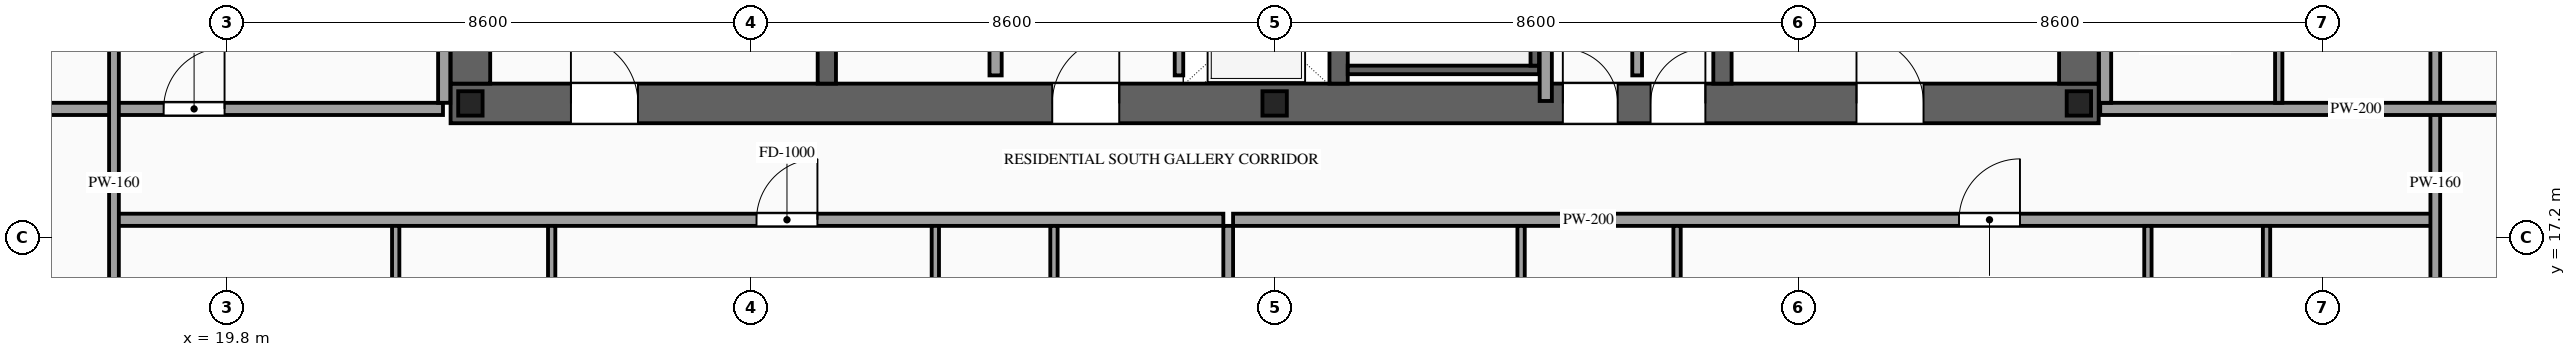
"""IFC4 building model, lengths in metres.
Left out: names, types, materials, properties, quantities, classifications, styles, units other than length and angle.
Written with IfcOpenShell. Run it as: python <this file> out.ifc"""

import sys

from ifc_helpers import new_model, si_unit, direction, frame, frame_2d, origin, origin_2d, place, context, subcontext, project, spatial, rectangle, i_section, extrude, source, transform, mapped, element, fill, save


model = new_model("IFC4")
c1 = context("Model", 3, precision=1e-05, world=origin(), true_north=direction((0.0, 1.0)))
c2 = subcontext(c1, "Body", "Model", "MODEL_VIEW")
j1 = project(units=[si_unit("LENGTHUNIT", "METRE"), si_unit("PLANEANGLEUNIT", "RADIAN")], contexts=[c1])
p1 = place(None, origin())
s1 = spatial("IfcSite", under=j1, at=p1, CompositionType="ELEMENT")
p2 = place(p1, origin())
s2 = spatial("IfcBuilding", under=s1, at=p2, CompositionType="ELEMENT")
p3 = place(p2, frame((0.0, 0.0, 191.5)))
s3 = spatial("IfcBuildingStorey", under=s2, at=p3, CompositionType="ELEMENT", Elevation=191.5)
p4 = place(p3, frame((23.475, 19.4, 0.0), z_axis=(0.0, 0.0, 1.0), x_axis=(1.0, 0.0, 0.0)))
e1 = element("IfcWall", 1, at=p4, inside=s3, PredefinedType="SHEAR", context=c2, shape_type="SweptSolid", body=[
    extrude(rectangle(XDim=27.05, YDim=0.65, at=frame_2d((13.525, 0.0))), origin(), (0.0, 0.0, 1.0), 3.5),
])
p5 = place(p4, frame((1.975, 0.0, 0.0)))
e2 = element("IfcOpeningElement", 2, at=p5, cuts=e1, PredefinedType="OPENING", context=c2, shape_type="SweptSolid", body=[
    extrude(rectangle(XDim=1.1, YDim=2.2, at=frame_2d((0.55, 1.1))), frame((0.0, 0.34, 0.0), z_axis=(0.0, -1.0, 0.0), x_axis=(1.0, 0.0, 0.0)), (0.0, 0.0, 1.0), 0.68),
])
p6 = place(p4, frame((9.875, 0.0, 0.0)))
e3 = element("IfcOpeningElement", 3, at=p6, cuts=e1, PredefinedType="OPENING", context=c2, shape_type="SweptSolid", body=[
    extrude(rectangle(XDim=1.1, YDim=2.2, at=frame_2d((0.55, 1.1))), frame((0.0, 0.34, 0.0), z_axis=(0.0, -1.0, 0.0), x_axis=(1.0, 0.0, 0.0)), (0.0, 0.0, 1.0), 0.68),
])
p7 = place(p4, frame((23.075, 0.0, 0.0)))
e4 = element("IfcOpeningElement", 4, at=p7, cuts=e1, PredefinedType="OPENING", context=c2, shape_type="SweptSolid", body=[
    extrude(rectangle(XDim=1.1, YDim=2.2, at=frame_2d((0.55, 1.1))), frame((0.0, 0.34, 0.0), z_axis=(0.0, -1.0, 0.0), x_axis=(1.0, 0.0, 0.0)), (0.0, 0.0, 1.0), 0.68),
])
p8 = place(p4, frame((19.695, 0.0, 0.0)))
e5 = element("IfcOpeningElement", 5, at=p8, cuts=e1, PredefinedType="OPENING", context=c2, shape_type="SweptSolid", body=[
    extrude(rectangle(XDim=0.9, YDim=2.15, at=frame_2d((0.45, 1.075))), frame((0.0, 0.34, 0.0), z_axis=(0.0, -1.0, 0.0), x_axis=(1.0, 0.0, 0.0)), (0.0, 0.0, 1.0), 0.68),
])
p9 = place(p4, frame((18.255, 0.0, 0.0)))
e6 = element("IfcOpeningElement", 6, at=p9, cuts=e1, PredefinedType="OPENING", context=c2, shape_type="SweptSolid", body=[
    extrude(rectangle(XDim=0.9, YDim=2.15, at=frame_2d((0.45, 1.075))), frame((0.0, 0.34, 0.0), z_axis=(0.0, -1.0, 0.0), x_axis=(1.0, 0.0, 0.0)), (0.0, 0.0, 1.0), 0.68),
])
m1 = source(origin(), c2, "Body", "SweptSolid", [
    extrude(rectangle(XDim=12.15, YDim=0.65, at=frame_2d((6.075, 0.0))), origin(), (0.0, 0.0, 1.0), 3.5),
])
for number, where, z_axis, x_axis in (
    (7, (23.8, 19.725, 0.0), (0.0, 0.0, 1.0), (0.0, 1.0, 0.0)),
    (8, (50.2, 19.725, 0.0), (0.0, 0.0, 1.0), (0.0, 1.0, 0.0)),
):
    element("IfcWall", number, at=place(p3, frame(where, z_axis=z_axis, x_axis=x_axis)), inside=s3, PredefinedType="SHEAR", context=c2, shape_type="MappedRepresentation", body=[
        mapped(m1, transform((0.0, 0.0, 0.0), scale=1.0)),
    ])
m2 = source(origin(), c2, "Body", "SweptSolid", [
    extrude(rectangle(XDim=12.15, YDim=0.3, at=frame_2d((6.075, 0.0))), origin(), (0.0, 0.0, 1.0), 3.5),
])
for number, where, z_axis, x_axis in (
    (9, (29.65, 19.725, 0.0), (0.0, 0.0, 1.0), (0.0, 1.0, 0.0)),
    (10, (38.05, 19.725, 0.0), (0.0, 0.0, 1.0), (0.0, 1.0, 0.0)),
    (11, (44.35, 19.725, 0.0), (0.0, 0.0, 1.0), (0.0, 1.0, 0.0)),
):
    element("IfcWall", number, at=place(p3, frame(where, z_axis=z_axis, x_axis=x_axis)), inside=s3, PredefinedType="SOLIDWALL", context=c2, shape_type="MappedRepresentation", body=[
        mapped(m2, transform((0.0, 0.0, 0.0), scale=1.0)),
    ])
m3 = source(origin(), c2, "Body", "SweptSolid", [
    extrude(i_section(OverallWidth=0.4, OverallDepth=0.4, WebThickness=0.013, FlangeThickness=0.021, at=origin_2d()), origin(), (0.0, 0.0, 1.0), 3.5),
])
for number, where, z_axis, x_axis in (
    (12, (23.8, 19.4, 0.0), (0.0, 0.0, 1.0), (1.0, 0.0, 0.0)),
    (13, (37.0, 19.4, 0.0), (0.0, 0.0, 1.0), (1.0, 0.0, 0.0)),
    (14, (50.2, 19.4, 0.0), (0.0, 0.0, 1.0), (1.0, 0.0, 0.0)),
):
    element("IfcColumn", number, at=place(p3, frame(where, z_axis=z_axis, x_axis=x_axis)), inside=s3, PredefinedType="COLUMN", context=c2, shape_type="MappedRepresentation", body=[
        mapped(m3, transform((0.0, 0.0, 0.0), scale=1.0)),
    ])
p10 = place(p3, frame((35.43, 19.86, 0.0), z_axis=(0.0, 0.0, 1.0), x_axis=(0.0, 1.0, 0.0)))
e15 = element("IfcWall", 15, at=p10, inside=s3, PredefinedType="SOLIDWALL", context=c2, shape_type="SweptSolid", body=[
    extrude(rectangle(XDim=2.04, YDim=0.14, at=frame_2d((1.02, 0.0))), origin(), (0.0, 0.0, 1.0), 3.28),
])
p11 = place(p10, frame((0.47, 0.0, 0.0)))
e16 = element("IfcOpeningElement", 16, at=p11, cuts=e15, PredefinedType="OPENING", context=c2, shape_type="SweptSolid", body=[
    extrude(rectangle(XDim=1.1, YDim=2.2, at=frame_2d((0.55, 1.1))), frame((0.0, 0.085, 0.0), z_axis=(0.0, -1.0, 0.0), x_axis=(1.0, 0.0, 0.0)), (0.0, 0.0, 1.0), 0.17),
])
m4 = source(origin(), c2, "Body", "SweptSolid", [
    extrude(rectangle(XDim=3.14, YDim=0.14, at=frame_2d((1.57, 0.0))), origin(), (0.0, 0.0, 1.0), 3.28),
])
p12 = place(p3, frame((38.2, 19.95, 0.0), z_axis=(0.0, 0.0, 1.0), x_axis=(1.0, 0.0, 0.0)))
e17 = element("IfcWall", 17, at=p12, inside=s3, PredefinedType="SOLIDWALL", context=c2, shape_type="MappedRepresentation", body=[
    mapped(m4, transform((0.0, 0.0, 0.0), scale=1.0)),
])
m5 = source(origin(), c2, "Body", "SweptSolid", [
    extrude(rectangle(XDim=8.94, YDim=0.14, at=frame_2d((4.47, 0.0))), origin(), (0.0, 0.0, 1.0), 3.28),
])
p13 = place(p3, frame((41.27, 20.02, 0.0), z_axis=(0.0, 0.0, 1.0), x_axis=(0.0, 1.0, 0.0)))
e18 = element("IfcWall", 18, at=p13, inside=s3, PredefinedType="SOLIDWALL", context=c2, shape_type="MappedRepresentation", body=[
    mapped(m5, transform((0.0, 0.0, 0.0), scale=1.0)),
])
p14 = place(p3, frame((32.42, 19.86, 0.0), z_axis=(0.0, 0.0, 1.0), x_axis=(0.0, 1.0, 0.0)))
e19 = element("IfcWall", 19, at=p14, inside=s3, PredefinedType="PARTITIONING", context=c2, shape_type="SweptSolid", body=[
    extrude(rectangle(XDim=7.94, YDim=0.2, at=frame_2d((3.97, 0.0))), origin(), (0.0, 0.0, 1.0), 3.28),
])
p15 = place(p14, frame((3.52, 0.0, 0.0)))
e20 = element("IfcOpeningElement", 20, at=p15, cuts=e19, PredefinedType="OPENING", context=c2, shape_type="SweptSolid", body=[
    extrude(rectangle(XDim=0.9, YDim=2.15, at=frame_2d((0.45, 1.075))), frame((0.0, 0.115, 0.0), z_axis=(0.0, -1.0, 0.0), x_axis=(1.0, 0.0, 0.0)), (0.0, 0.0, 1.0), 0.23),
])
m6 = source(origin(), c2, "Body", "SweptSolid", [
    extrude(rectangle(XDim=1.34, YDim=0.16, at=frame_2d((0.67, 0.0))), origin(), (0.0, 0.0, 1.0), 3.28),
])
p16 = place(p3, frame((42.95, 19.86, 0.0), z_axis=(0.0, 0.0, 1.0), x_axis=(0.0, 1.0, 0.0)))
e21 = element("IfcWall", 21, at=p16, inside=s3, PredefinedType="PARTITIONING", context=c2, shape_type="MappedRepresentation", body=[
    mapped(m6, transform((0.0, 0.0, 0.0), scale=1.0)),
])
m7 = source(origin(), c2, "Body", "SweptSolid", [
    extrude(rectangle(XDim=6.51, YDim=0.2, at=frame_2d((3.255, 0.0))), origin(), (0.0, 0.0, 1.0), 3.28),
])
p17 = place(p3, frame((41.45, 19.44, 0.0), z_axis=(0.0, 0.0, 1.0), x_axis=(0.0, 1.0, 0.0)))
e22 = element("IfcWall", 22, at=p17, inside=s3, PredefinedType="PARTITIONING", context=c2, shape_type="MappedRepresentation", body=[
    mapped(m7, transform((0.0, 0.0, 0.0), scale=1.0)),
])
p18 = place(p3, frame((17.94, 17.49, 0.0), z_axis=(0.0, 0.0, 1.0), x_axis=(1.0, 0.0, 0.0)))
e23 = element("IfcWall", 23, at=p18, inside=s3, PredefinedType="PARTITIONING", context=c2, shape_type="SweptSolid", body=[
    extrude(rectangle(XDim=18.218, YDim=0.2, at=frame_2d((9.109, 0.0))), origin(), (0.0, 0.0, 1.0), 3.28),
])
p19 = place(p18, frame((10.556, 0.0, 0.0)))
e24 = element("IfcOpeningElement", 24, at=p19, cuts=e23, PredefinedType="OPENING", context=c2, shape_type="SweptSolid", body=[
    extrude(rectangle(XDim=1.0, YDim=2.2, at=frame_2d((0.5, 1.1))), frame((0.0, 0.115, 0.0), z_axis=(0.0, -1.0, 0.0), x_axis=(1.0, 0.0, 0.0)), (0.0, 0.0, 1.0), 0.23),
])
m8 = source(origin(), c2, "Body", "SweptSolid", [
    extrude(rectangle(XDim=13.54, YDim=0.16, at=frame_2d((6.77, 0.0))), origin(), (0.0, 0.0, 1.0), 3.28),
])
p20 = place(p3, frame((36.238, 3.85, 0.0), z_axis=(0.0, 0.0, 1.0), x_axis=(0.0, 1.0, 0.0)))
e25 = element("IfcWall", 25, at=p20, inside=s3, PredefinedType="PARTITIONING", context=c2, shape_type="MappedRepresentation", body=[
    mapped(m8, transform((0.0, 0.0, 0.0), scale=1.0)),
])
m9 = source(origin(), c2, "Body", "SweptSolid", [
    extrude(rectangle(XDim=5.61, YDim=0.12, at=frame_2d((2.805, 0.0))), origin(), (0.0, 0.0, 1.0), 3.28),
])
p21 = place(p3, frame((22.574, 11.78, 0.0), z_axis=(0.0, 0.0, 1.0), x_axis=(0.0, 1.0, 0.0)))
e26 = element("IfcWall", 26, at=p21, inside=s3, PredefinedType="PARTITIONING", context=c2, shape_type="MappedRepresentation", body=[
    mapped(m9, transform((0.0, 0.0, 0.0), scale=1.0)),
])
p22 = place(p3, frame((25.134, 11.78, 0.0), z_axis=(0.0, 0.0, 1.0), x_axis=(0.0, 1.0, 0.0)))
e27 = element("IfcWall", 27, at=p22, inside=s3, PredefinedType="PARTITIONING", context=c2, shape_type="SweptSolid", body=[
    extrude(rectangle(XDim=5.61, YDim=0.12, at=frame_2d((2.805, 0.0))), origin(), (0.0, 0.0, 1.0), 3.28),
])
p23 = place(p22, frame((2.38, 0.0, 0.0)))
e28 = element("IfcOpeningElement", 28, at=p23, cuts=e27, PredefinedType="OPENING", context=c2, shape_type="SweptSolid", body=[
    extrude(rectangle(XDim=0.85, YDim=2.1, at=frame_2d((0.425, 1.05))), frame((0.0, 0.075, 0.0), z_axis=(0.0, -1.0, 0.0), x_axis=(1.0, 0.0, 0.0)), (0.0, 0.0, 1.0), 0.15),
])
for number, where, z_axis, x_axis in (
    (29, (33.378, 11.78, 0.0), (0.0, 0.0, 1.0), (0.0, 1.0, 0.0)),
    (30, (31.431, 11.78, 0.0), (0.0, 0.0, 1.0), (0.0, 1.0, 0.0)),
):
    element("IfcWall", number, at=place(p3, frame(where, z_axis=z_axis, x_axis=x_axis)), inside=s3, PredefinedType="PARTITIONING", context=c2, shape_type="MappedRepresentation", body=[
        mapped(m9, transform((0.0, 0.0, 0.0), scale=1.0)),
    ])
p24 = place(p3, frame((36.318, 17.49, 0.0), z_axis=(0.0, 0.0, 1.0), x_axis=(1.0, 0.0, 0.0)))
e31 = element("IfcWall", 31, at=p24, inside=s3, PredefinedType="PARTITIONING", context=c2, shape_type="SweptSolid", body=[
    extrude(rectangle(XDim=19.742, YDim=0.2, at=frame_2d((9.871, 0.0))), origin(), (0.0, 0.0, 1.0), 3.28),
])
p25 = place(p24, frame((11.915, 0.0, 0.0)))
e32 = element("IfcOpeningElement", 32, at=p25, cuts=e31, PredefinedType="OPENING", context=c2, shape_type="SweptSolid", body=[
    extrude(rectangle(XDim=1.0, YDim=2.2, at=frame_2d((0.5, 1.1))), frame((0.0, 0.115, 0.0), z_axis=(0.0, -1.0, 0.0), x_axis=(1.0, 0.0, 0.0)), (0.0, 0.0, 1.0), 0.23),
])
p26 = place(p3, frame((41.045, 11.78, 0.0), z_axis=(0.0, 0.0, 1.0), x_axis=(0.0, 1.0, 0.0)))
e33 = element("IfcWall", 33, at=p26, inside=s3, PredefinedType="PARTITIONING", context=c2, shape_type="MappedRepresentation", body=[
    mapped(m9, transform((0.0, 0.0, 0.0), scale=1.0)),
])
p27 = place(p3, frame((43.605, 11.78, 0.0), z_axis=(0.0, 0.0, 1.0), x_axis=(0.0, 1.0, 0.0)))
e34 = element("IfcWall", 34, at=p27, inside=s3, PredefinedType="PARTITIONING", context=c2, shape_type="SweptSolid", body=[
    extrude(rectangle(XDim=5.61, YDim=0.12, at=frame_2d((2.805, 0.0))), origin(), (0.0, 0.0, 1.0), 3.28),
])
p28 = place(p27, frame((2.38, 0.0, 0.0)))
e35 = element("IfcOpeningElement", 35, at=p28, cuts=e34, PredefinedType="OPENING", context=c2, shape_type="SweptSolid", body=[
    extrude(rectangle(XDim=0.85, YDim=2.1, at=frame_2d((0.425, 1.05))), frame((0.0, 0.075, 0.0), z_axis=(0.0, -1.0, 0.0), x_axis=(1.0, 0.0, 0.0)), (0.0, 0.0, 1.0), 0.15),
])
for number, where, z_axis, x_axis in (
    (36, (53.28, 11.78, 0.0), (0.0, 0.0, 1.0), (0.0, 1.0, 0.0)),
    (37, (51.333, 11.78, 0.0), (0.0, 0.0, 1.0), (0.0, 1.0, 0.0)),
):
    element("IfcWall", number, at=place(p3, frame(where, z_axis=z_axis, x_axis=x_axis)), inside=s3, PredefinedType="PARTITIONING", context=c2, shape_type="MappedRepresentation", body=[
        mapped(m9, transform((0.0, 0.0, 0.0), scale=1.0)),
    ])
p29 = place(p3, frame((15.05, 19.31, 0.0), z_axis=(0.0, 0.0, 1.0), x_axis=(1.0, 0.0, 0.0)))
e38 = element("IfcWall", 38, at=p29, inside=s3, PredefinedType="PARTITIONING", context=c2, shape_type="SweptSolid", body=[
    extrude(rectangle(XDim=8.3, YDim=0.2, at=frame_2d((4.15, 0.0))), origin(), (0.0, 0.0, 1.0), 2.775),
])
p30 = place(p29, frame((3.715, 0.0, 0.0)))
e39 = element("IfcOpeningElement", 39, at=p30, cuts=e38, PredefinedType="OPENING", context=c2, shape_type="SweptSolid", body=[
    extrude(rectangle(XDim=1.0, YDim=2.2, at=frame_2d((0.5, 1.1))), frame((0.0, 0.115, 0.0), z_axis=(0.0, -1.0, 0.0), x_axis=(1.0, 0.0, 0.0)), (0.0, 0.0, 1.0), 0.23),
])
m10 = source(origin(), c2, "Body", "SweptSolid", [
    extrude(rectangle(XDim=6.29, YDim=0.2, at=frame_2d((3.145, 0.0))), origin(), (0.0, 0.0, 1.0), 3.28),
])
p31 = place(p3, frame((23.37, 19.41, 0.0), z_axis=(0.0, 0.0, 1.0), x_axis=(0.0, 1.0, 0.0)))
e40 = element("IfcWall", 40, at=p31, inside=s3, PredefinedType="PARTITIONING", context=c2, shape_type="MappedRepresentation", body=[
    mapped(m10, transform((0.0, 0.0, 0.0), scale=1.0)),
])
m11 = source(origin(), c2, "Body", "SweptSolid", [
    extrude(rectangle(XDim=28.19, YDim=0.16, at=frame_2d((14.095, 0.0))), origin(), (0.0, 0.0, 1.0), 3.28),
])
for number, where, z_axis, x_axis in (
    (41, (17.95, 4.0, 0.0), (0.0, 0.0, 1.0), (0.0, 1.0, 0.0)),
    (42, (56.05, 4.0, 0.0), (0.0, 0.0, 1.0), (0.0, 1.0, 0.0)),
):
    element("IfcWall", number, at=place(p3, frame(where, z_axis=z_axis, x_axis=x_axis)), inside=s3, PredefinedType="PARTITIONING", context=c2, shape_type="MappedRepresentation", body=[
        mapped(m11, transform((0.0, 0.0, 0.0), scale=1.0)),
    ])
m12 = source(origin(), c2, "Body", "SweptSolid", [
    extrude(rectangle(XDim=8.4, YDim=0.2, at=frame_2d((4.2, 0.0))), origin(), (0.0, 0.0, 1.0), 2.775),
])
p32 = place(p3, frame((50.55, 19.31, 0.0), z_axis=(0.0, 0.0, 1.0), x_axis=(1.0, 0.0, 0.0)))
e43 = element("IfcWall", 43, at=p32, inside=s3, PredefinedType="PARTITIONING", context=c2, shape_type="MappedRepresentation", body=[
    mapped(m12, transform((0.0, 0.0, 0.0), scale=1.0)),
])
m13 = source(origin(), c2, "Body", "SweptSolid", [
    extrude(rectangle(XDim=12.78, YDim=0.2, at=frame_2d((6.39, 0.0))), origin(), (0.0, 0.0, 1.0), 3.28),
])
p33 = place(p3, frame((50.63, 19.41, 0.0), z_axis=(0.0, 0.0, 1.0), x_axis=(0.0, 1.0, 0.0)))
e44 = element("IfcWall", 44, at=p33, inside=s3, PredefinedType="PARTITIONING", context=c2, shape_type="MappedRepresentation", body=[
    mapped(m13, transform((0.0, 0.0, 0.0), scale=1.0)),
])
p34 = place(p3, frame((53.48, 19.41, 0.0), z_axis=(0.0, 0.0, 1.0), x_axis=(0.0, 1.0, 0.0)))
e45 = element("IfcWall", 45, at=p34, inside=s3, PredefinedType="PARTITIONING", context=c2, shape_type="SweptSolid", body=[
    extrude(rectangle(XDim=5.623, YDim=0.12, at=frame_2d((2.812, 0.0))), origin(), (0.0, 0.0, 1.0), 3.28),
])
p35 = place(p34, frame((2.386, 0.0, 0.0)))
e46 = element("IfcOpeningElement", 46, at=p35, cuts=e45, PredefinedType="OPENING", context=c2, shape_type="SweptSolid", body=[
    extrude(rectangle(XDim=0.85, YDim=2.1, at=frame_2d((0.425, 1.05))), frame((0.0, 0.075, 0.0), z_axis=(0.0, -1.0, 0.0), x_axis=(1.0, 0.0, 0.0)), (0.0, 0.0, 1.0), 0.15),
])
m14 = source(origin(), c2, "Body", "SweptSolid", [
    extrude(rectangle(XDim=1.1, YDim=2.2, at=frame_2d((0.55, 1.1))), frame((0.0, 0.025, 0.0), z_axis=(0.0, -1.0, 0.0), x_axis=(1.0, 0.0, 0.0)), (0.0, 0.0, 1.0), 0.05),
])
p36 = place(p5, origin())
e47 = element("IfcDoor", 47, at=p36, inside=s3, OperationType="SINGLE_SWING_LEFT", PredefinedType="DOOR", context=c2, shape_type="MappedRepresentation", body=[
    mapped(m14, transform((0.0, 0.0, 0.0), scale=1.0)),
])
fill(e2, e47)
p37 = place(p6, origin())
e48 = element("IfcDoor", 48, at=p37, inside=s3, OperationType="SINGLE_SWING_RIGHT", PredefinedType="DOOR", context=c2, shape_type="MappedRepresentation", body=[
    mapped(m14, transform((0.0, 0.0, 0.0), scale=1.0)),
])
fill(e3, e48)
p38 = place(p7, origin())
e49 = element("IfcDoor", 49, at=p38, inside=s3, OperationType="SINGLE_SWING_LEFT", PredefinedType="DOOR", context=c2, shape_type="MappedRepresentation", body=[
    mapped(m14, transform((0.0, 0.0, 0.0), scale=1.0)),
])
fill(e4, e49)
m15 = source(origin(), c2, "Body", "SweptSolid", [
    extrude(rectangle(XDim=0.9, YDim=2.15, at=frame_2d((0.45, 1.075))), frame((0.0, 0.025, 0.0), z_axis=(0.0, -1.0, 0.0), x_axis=(1.0, 0.0, 0.0)), (0.0, 0.0, 1.0), 0.05),
])
p39 = place(p8, origin())
e50 = element("IfcDoor", 50, at=p39, inside=s3, OperationType="SINGLE_SWING_RIGHT", PredefinedType="DOOR", context=c2, shape_type="MappedRepresentation", body=[
    mapped(m15, transform((0.0, 0.0, 0.0), scale=1.0)),
])
fill(e5, e50)
p40 = place(p9, origin())
e51 = element("IfcDoor", 51, at=p40, inside=s3, OperationType="SINGLE_SWING_LEFT", PredefinedType="DOOR", context=c2, shape_type="MappedRepresentation", body=[
    mapped(m15, transform((0.0, 0.0, 0.0), scale=1.0)),
])
fill(e6, e51)
m16 = source(origin(), c2, "Body", "SweptSolid", [
    extrude(rectangle(XDim=1.0, YDim=2.2, at=frame_2d((0.5, 1.1))), frame((0.0, 0.025, 0.0), z_axis=(0.0, -1.0, 0.0), x_axis=(1.0, 0.0, 0.0)), (0.0, 0.0, 1.0), 0.05),
])
p41 = place(p19, origin())
e52 = element("IfcDoor", 52, at=p41, inside=s3, OperationType="SINGLE_SWING_RIGHT", PredefinedType="DOOR", context=c2, shape_type="MappedRepresentation", body=[
    mapped(m16, transform((0.0, 0.0, 0.0), scale=1.0)),
])
fill(e24, e52)
p42 = place(p25, origin())
e53 = element("IfcDoor", 53, at=p42, inside=s3, OperationType="SINGLE_SWING_RIGHT", PredefinedType="DOOR", context=c2, shape_type="MappedRepresentation", body=[
    mapped(m16, transform((0.0, 0.0, 0.0), scale=1.0)),
])
fill(e32, e53)
p43 = place(p30, origin())
e54 = element("IfcDoor", 54, at=p43, inside=s3, OperationType="SINGLE_SWING_RIGHT", PredefinedType="DOOR", context=c2, shape_type="MappedRepresentation", body=[
    mapped(m16, transform((0.0, 0.0, 0.0), scale=1.0)),
])
fill(e39, e54)
save(model, sys.argv[1])
